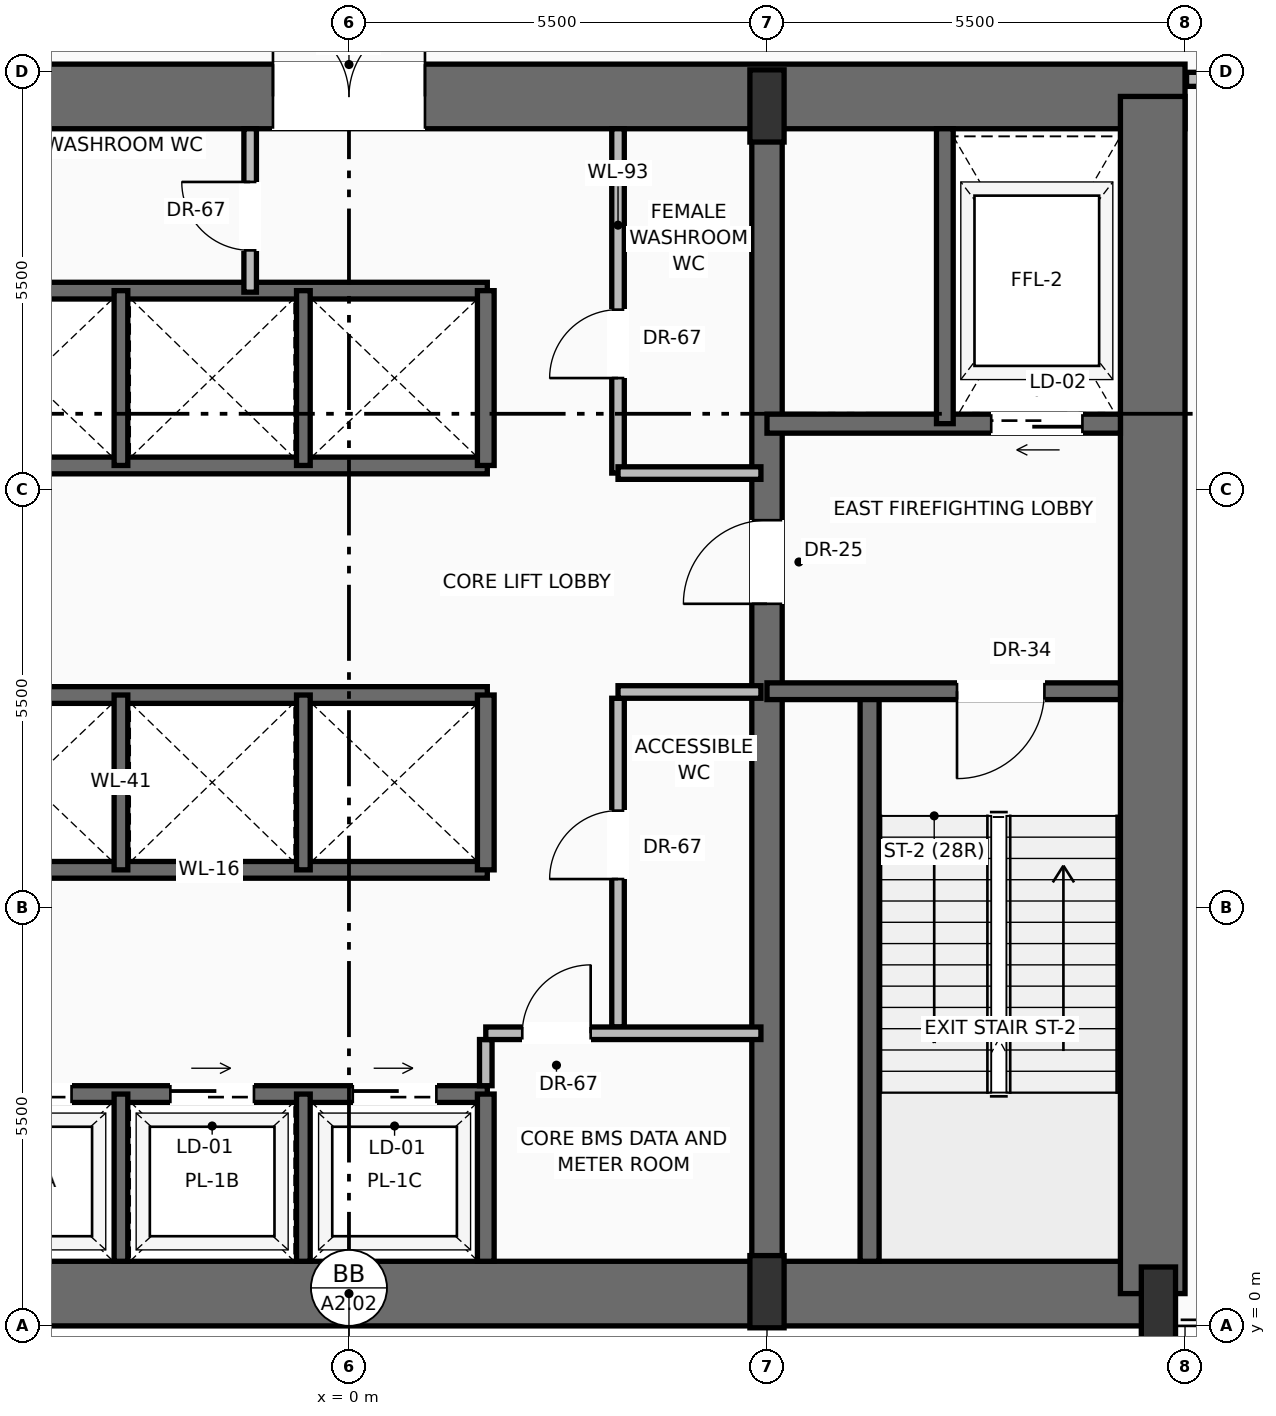
"""IFC4 building model, lengths in metres.
Left out: names, types, materials, properties, quantities, classifications, styles, units other than length and angle.
Written with IfcOpenShell. Run it as: python <this file> out.ifc"""

import sys

from ifc_helpers import new_model, si_unit, direction, frame, frame_2d, origin, origin_2d, place, context, subcontext, project, spatial, rectangle, extrude, source, transform, mapped, element, fill, save


model = new_model("IFC4")
c1 = context("Model", 3, precision=1e-05, world=origin(), true_north=direction((0.0, 1.0)))
c2 = subcontext(c1, "Body", "Model", "MODEL_VIEW")
j1 = project(units=[si_unit("LENGTHUNIT", "METRE"), si_unit("PLANEANGLEUNIT", "RADIAN")], contexts=[c1])
p1 = place(None, origin())
s1 = spatial("IfcSite", under=j1, at=p1, CompositionType="ELEMENT")
p2 = place(p1, origin())
s2 = spatial("IfcBuilding", under=s1, at=p2, CompositionType="ELEMENT")
p3 = place(p2, frame((0.0, 0.0, 71.9)))
s3 = spatial("IfcBuildingStorey", under=s2, at=p3, CompositionType="ELEMENT", Elevation=71.9)
p4 = place(p3, frame((-10.65, 0.425, 0.0), z_axis=(0.0, 0.0, 1.0), x_axis=(1.0, 0.0, 0.0)))
e1 = element("IfcWall", 1, at=p4, inside=s3, PredefinedType="SHEAR", context=c2, shape_type="SweptSolid", body=[
    extrude(rectangle(XDim=21.3, YDim=0.85, at=frame_2d((10.65, 0.0))), origin(), (0.0, 0.0, 1.0), 4.45),
])
p5 = place(p3, frame((-11.0, 16.175, 0.0), z_axis=(0.0, 0.0, 1.0), x_axis=(1.0, 0.0, 0.0)))
e2 = element("IfcWall", 2, at=p5, inside=s3, PredefinedType="SHEAR", context=c2, shape_type="SweptSolid", body=[
    extrude(rectangle(XDim=22.0, YDim=0.85, at=frame_2d((11.0, 0.0))), origin(), (0.0, 0.0, 1.0), 4.45),
])
p6 = place(p5, frame((3.57, 0.0, 0.0)))
e3 = element("IfcOpeningElement", 3, at=p6, cuts=e2, PredefinedType="OPENING", context=c2, shape_type="SweptSolid", body=[
    extrude(rectangle(XDim=1.3, YDim=2.3, at=frame_2d((0.65, 1.15))), frame((0.0, 0.435, 0.0), z_axis=(0.0, -1.0, 0.0), x_axis=(1.0, 0.0, 0.0)), (0.0, 0.0, 1.0), 0.87),
])
p7 = place(p5, frame((10.0, 0.0, 0.0)))
e4 = element("IfcOpeningElement", 4, at=p7, cuts=e2, PredefinedType="OPENING", context=c2, shape_type="SweptSolid", body=[
    extrude(rectangle(XDim=2.0, YDim=2.4, at=frame_2d((1.0, 1.2))), frame((0.0, 0.435, 0.0), z_axis=(0.0, -1.0, 0.0), x_axis=(1.0, 0.0, 0.0)), (0.0, 0.0, 1.0), 0.87),
])
p8 = place(p3, frame((10.575, 0.425, 0.0), z_axis=(0.0, 0.0, 1.0), x_axis=(0.0, 1.0, 0.0)))
e5 = element("IfcWall", 5, at=p8, inside=s3, PredefinedType="SHEAR", context=c2, shape_type="SweptSolid", body=[
    extrude(rectangle(XDim=15.75, YDim=0.85, at=frame_2d((7.875, 0.0))), origin(), (0.0, 0.0, 1.0), 4.45),
])
p9 = place(p3, frame((5.5, 0.425, 0.0), z_axis=(0.0, 0.0, 1.0), x_axis=(0.0, 1.0, 0.0)))
e6 = element("IfcWall", 6, at=p9, inside=s3, PredefinedType="SHEAR", context=c2, shape_type="SweptSolid", body=[
    extrude(rectangle(XDim=15.75, YDim=0.4, at=frame_2d((7.875, 0.0))), origin(), (0.0, 0.0, 1.0), 4.45),
])
p10 = place(p9, frame((9.075, 0.0, 0.0)))
e7 = element("IfcOpeningElement", 7, at=p10, cuts=e6, PredefinedType="OPENING", context=c2, shape_type="SweptSolid", body=[
    extrude(rectangle(XDim=1.1, YDim=2.2, at=frame_2d((0.55, 1.1))), frame((0.0, 0.21, 0.0), z_axis=(0.0, -1.0, 0.0), x_axis=(1.0, 0.0, 0.0)), (0.0, 0.0, 1.0), 0.42),
])
m1 = source(origin(), c2, "Body", "SweptSolid", [
    extrude(rectangle(XDim=0.45, YDim=0.95, at=origin_2d()), origin(), (0.0, 0.0, 1.0), 4.7),
])
for number, where, z_axis, x_axis in (
    (8, (5.5, 0.45, 0.0), (0.0, 0.0, 1.0), (1.0, 0.0, 0.0)),
    (9, (10.65, 0.3, 0.0), (0.0, 0.0, 1.0), (1.0, 0.0, 0.0)),
    (10, (5.5, 16.05, 0.0), (0.0, 0.0, 1.0), (1.0, 0.0, 0.0)),
):
    element("IfcColumn", number, at=place(p3, frame(where, z_axis=z_axis, x_axis=x_axis)), inside=s3, PredefinedType="PILASTER", context=c2, shape_type="MappedRepresentation", body=[
        mapped(m1, transform((0.0, 0.0, 0.0), scale=1.0)),
    ])
p11 = place(p3, frame((6.85, 0.85, 0.0), z_axis=(0.0, 0.0, 1.0), x_axis=(0.0, 1.0, 0.0)))
e11 = element("IfcWall", 11, at=p11, inside=s3, PredefinedType="SOLIDWALL", context=c2, shape_type="SweptSolid", body=[
    extrude(rectangle(XDim=7.5, YDim=0.25, at=frame_2d((3.75, 0.0))), origin(), (0.0, 0.0, 1.0), 4.45),
])
p12 = place(p3, frame((10.15, 8.35, 0.0), z_axis=(0.0, 0.0, 1.0), x_axis=(-1.0, 0.0, 0.0)))
e12 = element("IfcWall", 12, at=p12, inside=s3, PredefinedType="SOLIDWALL", context=c2, shape_type="SweptSolid", body=[
    extrude(rectangle(XDim=4.65, YDim=0.22, at=frame_2d((2.325, 0.0))), origin(), (0.0, 0.0, 1.0), 4.45),
])
p13 = place(p12, frame((1.0, 0.0, 0.0)))
e13 = element("IfcOpeningElement", 13, at=p13, cuts=e12, PredefinedType="OPENING", context=c2, shape_type="SweptSolid", body=[
    extrude(rectangle(XDim=1.15, YDim=2.2, at=frame_2d((0.575, 1.1))), frame((0.0, 0.12, 0.0), z_axis=(0.0, -1.0, 0.0), x_axis=(1.0, 0.0, 0.0)), (0.0, 0.0, 1.0), 0.24),
])
p14 = place(p3, frame((10.15, 11.87, 0.0), z_axis=(0.0, 0.0, 1.0), x_axis=(-1.0, 0.0, 0.0)))
e14 = element("IfcWall", 14, at=p14, inside=s3, PredefinedType="SOLIDWALL", context=c2, shape_type="SweptSolid", body=[
    extrude(rectangle(XDim=4.65, YDim=0.25, at=frame_2d((2.325, 0.0))), origin(), (0.0, 0.0, 1.0), 4.45),
])
p15 = place(p14, frame((0.5, 0.0, 0.0)))
e15 = element("IfcOpeningElement", 15, at=p15, cuts=e14, PredefinedType="OPENING", context=c2, shape_type="SweptSolid", body=[
    extrude(rectangle(XDim=1.2, YDim=2.25, at=frame_2d((0.6, 1.125))), frame((0.0, 0.135, 0.0), z_axis=(0.0, -1.0, 0.0), x_axis=(1.0, 0.0, 0.0)), (0.0, 0.0, 1.0), 0.27),
])
p16 = place(p3, frame((7.84, 11.87, 0.0), z_axis=(0.0, 0.0, 1.0), x_axis=(0.0, 1.0, 0.0)))
e16 = element("IfcWall", 16, at=p16, inside=s3, PredefinedType="SOLIDWALL", context=c2, shape_type="SweptSolid", body=[
    extrude(rectangle(XDim=3.88, YDim=0.22, at=frame_2d((1.94, 0.0))), origin(), (0.0, 0.0, 1.0), 4.45),
])
p17 = place(p3, frame((-5.5, 3.05, 0.0), z_axis=(0.0, 0.0, 1.0), x_axis=(1.0, 0.0, 0.0)))
e17 = element("IfcWall", 17, at=p17, inside=s3, PredefinedType="SOLIDWALL", context=c2, shape_type="SweptSolid", body=[
    extrude(rectangle(XDim=7.32, YDim=0.22, at=frame_2d((3.66, 0.0))), origin(), (0.0, 0.0, 1.0), 4.45),
])
p18 = place(p17, frame((0.75, 0.0, 0.0)))
e18 = element("IfcOpeningElement", 18, at=p18, cuts=e17, PredefinedType="OPENING", context=c2, shape_type="SweptSolid", body=[
    extrude(rectangle(XDim=1.1, YDim=2.2, at=frame_2d((0.55, 1.1))), frame((0.0, 0.12, 0.0), z_axis=(0.0, -1.0, 0.0), x_axis=(1.0, 0.0, 0.0)), (0.0, 0.0, 1.0), 0.24),
])
p19 = place(p17, frame((3.15, 0.0, 0.0)))
e19 = element("IfcOpeningElement", 19, at=p19, cuts=e17, PredefinedType="OPENING", context=c2, shape_type="SweptSolid", body=[
    extrude(rectangle(XDim=1.1, YDim=2.2, at=frame_2d((0.55, 1.1))), frame((0.0, 0.12, 0.0), z_axis=(0.0, -1.0, 0.0), x_axis=(1.0, 0.0, 0.0)), (0.0, 0.0, 1.0), 0.24),
])
p20 = place(p17, frame((5.55, 0.0, 0.0)))
e20 = element("IfcOpeningElement", 20, at=p20, cuts=e17, PredefinedType="OPENING", context=c2, shape_type="SweptSolid", body=[
    extrude(rectangle(XDim=1.1, YDim=2.2, at=frame_2d((0.55, 1.1))), frame((0.0, 0.12, 0.0), z_axis=(0.0, -1.0, 0.0), x_axis=(1.0, 0.0, 0.0)), (0.0, 0.0, 1.0), 0.24),
])
p21 = place(p3, frame((1.8, 0.85, 0.0), z_axis=(0.0, 0.0, 1.0), x_axis=(0.0, 1.0, 0.0)))
e21 = element("IfcWall", 21, at=p21, inside=s3, PredefinedType="SOLIDWALL", context=c2, shape_type="SweptSolid", body=[
    extrude(rectangle(XDim=2.2, YDim=0.22, at=frame_2d((1.1, 0.0))), origin(), (0.0, 0.0, 1.0), 4.45),
])
for number, where, z_axis, x_axis in (
    (22, (-3.0, 0.85, 0.0), (0.0, 0.0, 1.0), (0.0, 1.0, 0.0)),
    (23, (-0.6, 0.85, 0.0), (0.0, 0.0, 1.0), (0.0, 1.0, 0.0)),
):
    element("IfcWall", number, at=place(p3, frame(where, z_axis=z_axis, x_axis=x_axis)), inside=s3, PredefinedType="SOLIDWALL", context=c2, shape_type="SweptSolid", body=[
        extrude(rectangle(XDim=2.2, YDim=0.18, at=frame_2d((1.1, 0.0))), origin(), (0.0, 0.0, 1.0), 4.45),
    ])
p22 = place(p3, frame((1.8, 3.16, 0.0), z_axis=(0.0, 0.0, 1.0), x_axis=(0.0, 1.0, 0.0)))
e24 = element("IfcWall", 24, at=p22, inside=s3, PredefinedType="PARTITIONING", context=c2, shape_type="SweptSolid", body=[
    extrude(rectangle(XDim=0.608, YDim=0.165, at=frame_2d((0.304, 0.0))), origin(), (0.0, 0.0, 1.0), 4.442),
])
p23 = place(p3, frame((3.54, 3.933, 0.0), z_axis=(0.0, 0.0, 1.0), x_axis=(0.0, 1.0, 0.0)))
e25 = element("IfcWall", 25, at=p23, inside=s3, PredefinedType="PARTITIONING", context=c2, shape_type="SweptSolid", body=[
    extrude(rectangle(XDim=4.325, YDim=0.165, at=frame_2d((2.163, 0.0))), origin(), (0.0, 0.0, 1.0), 4.442),
])
p24 = place(p23, frame((1.946, 0.0, 0.0)))
e26 = element("IfcOpeningElement", 26, at=p24, cuts=e25, PredefinedType="OPENING", context=c2, shape_type="SweptSolid", body=[
    extrude(rectangle(XDim=0.9, YDim=2.1, at=frame_2d((0.45, 1.05))), frame((0.0, 0.093, 0.0), z_axis=(0.0, -1.0, 0.0), x_axis=(1.0, 0.0, 0.0)), (0.0, 0.0, 1.0), 0.185),
])
p25 = place(p3, frame((3.54, 8.34, 0.0), z_axis=(0.0, 0.0, 1.0), x_axis=(1.0, 0.0, 0.0)))
e27 = element("IfcWall", 27, at=p25, inside=s3, PredefinedType="PARTITIONING", context=c2, shape_type="SweptSolid", body=[
    extrude(rectangle(XDim=1.88, YDim=0.165, at=frame_2d((0.94, 0.0))), origin(), (0.0, 0.0, 1.0), 4.442),
])
p26 = place(p3, frame((1.8, 3.85, 0.0), z_axis=(0.0, 0.0, 1.0), x_axis=(1.0, 0.0, 0.0)))
e28 = element("IfcWall", 28, at=p26, inside=s3, PredefinedType="PARTITIONING", context=c2, shape_type="SweptSolid", body=[
    extrude(rectangle(XDim=3.62, YDim=0.165, at=frame_2d((1.81, 0.0))), origin(), (0.0, 0.0, 1.0), 4.442),
])
p27 = place(p26, frame((0.48, 0.0, 0.0)))
e29 = element("IfcOpeningElement", 29, at=p27, cuts=e28, PredefinedType="OPENING", context=c2, shape_type="SweptSolid", body=[
    extrude(rectangle(XDim=0.9, YDim=2.1, at=frame_2d((0.45, 1.05))), frame((0.0, 0.093, 0.0), z_axis=(0.0, -1.0, 0.0), x_axis=(1.0, 0.0, 0.0)), (0.0, 0.0, 1.0), 0.185),
])
for number, where, z_axis, x_axis in (
    (30, (-5.5, 6.0, 0.0), (0.0, 0.0, 1.0), (1.0, 0.0, 0.0)),
    (31, (-5.5, 8.3, 0.0), (0.0, 0.0, 1.0), (1.0, 0.0, 0.0)),
):
    element("IfcWall", number, at=place(p3, frame(where, z_axis=z_axis, x_axis=x_axis)), inside=s3, PredefinedType="SOLIDWALL", context=c2, shape_type="SweptSolid", body=[
        extrude(rectangle(XDim=7.32, YDim=0.22, at=frame_2d((3.66, 0.0))), origin(), (0.0, 0.0, 1.0), 4.45),
    ])
p28 = place(p3, frame((1.8, 6.0, 0.0), z_axis=(0.0, 0.0, 1.0), x_axis=(0.0, 1.0, 0.0)))
e32 = element("IfcWall", 32, at=p28, inside=s3, PredefinedType="SOLIDWALL", context=c2, shape_type="SweptSolid", body=[
    extrude(rectangle(XDim=2.3, YDim=0.22, at=frame_2d((1.15, 0.0))), origin(), (0.0, 0.0, 1.0), 4.45),
])
for number, where, z_axis, x_axis in (
    (33, (-3.0, 6.0, 0.0), (0.0, 0.0, 1.0), (0.0, 1.0, 0.0)),
    (34, (-0.6, 6.0, 0.0), (0.0, 0.0, 1.0), (0.0, 1.0, 0.0)),
):
    element("IfcWall", number, at=place(p3, frame(where, z_axis=z_axis, x_axis=x_axis)), inside=s3, PredefinedType="SOLIDWALL", context=c2, shape_type="SweptSolid", body=[
        extrude(rectangle(XDim=2.3, YDim=0.18, at=frame_2d((1.15, 0.0))), origin(), (0.0, 0.0, 1.0), 4.45),
    ])
for number, where, z_axis, x_axis in (
    (35, (-5.5, 11.32, 0.0), (0.0, 0.0, 1.0), (1.0, 0.0, 0.0)),
    (36, (-5.5, 13.62, 0.0), (0.0, 0.0, 1.0), (1.0, 0.0, 0.0)),
):
    element("IfcWall", number, at=place(p3, frame(where, z_axis=z_axis, x_axis=x_axis)), inside=s3, PredefinedType="SOLIDWALL", context=c2, shape_type="SweptSolid", body=[
        extrude(rectangle(XDim=7.32, YDim=0.22, at=frame_2d((3.66, 0.0))), origin(), (0.0, 0.0, 1.0), 4.45),
    ])
p29 = place(p3, frame((1.8, 11.32, 0.0), z_axis=(0.0, 0.0, 1.0), x_axis=(0.0, 1.0, 0.0)))
e37 = element("IfcWall", 37, at=p29, inside=s3, PredefinedType="SOLIDWALL", context=c2, shape_type="SweptSolid", body=[
    extrude(rectangle(XDim=2.3, YDim=0.22, at=frame_2d((1.15, 0.0))), origin(), (0.0, 0.0, 1.0), 4.45),
])
for number, where, z_axis, x_axis in (
    (38, (-3.0, 11.32, 0.0), (0.0, 0.0, 1.0), (0.0, 1.0, 0.0)),
    (39, (-0.6, 11.32, 0.0), (0.0, 0.0, 1.0), (0.0, 1.0, 0.0)),
):
    element("IfcWall", number, at=place(p3, frame(where, z_axis=z_axis, x_axis=x_axis)), inside=s3, PredefinedType="SOLIDWALL", context=c2, shape_type="SweptSolid", body=[
        extrude(rectangle(XDim=2.3, YDim=0.18, at=frame_2d((1.15, 0.0))), origin(), (0.0, 0.0, 1.0), 4.45),
    ])
p30 = place(p3, frame((-1.3, 13.6, 0.0), z_axis=(0.0, 0.0, 1.0), x_axis=(0.0, 1.0, 0.0)))
e40 = element("IfcWall", 40, at=p30, inside=s3, PredefinedType="PARTITIONING", context=c2, shape_type="SweptSolid", body=[
    extrude(rectangle(XDim=2.15, YDim=0.165, at=frame_2d((1.075, 0.0))), origin(), (0.0, 0.0, 1.0), 4.442),
])
p31 = place(p30, frame((0.55, 0.0, 0.0)))
e41 = element("IfcOpeningElement", 41, at=p31, cuts=e40, PredefinedType="OPENING", context=c2, shape_type="SweptSolid", body=[
    extrude(rectangle(XDim=0.9, YDim=2.1, at=frame_2d((0.45, 1.05))), frame((0.0, 0.093, 0.0), z_axis=(0.0, -1.0, 0.0), x_axis=(1.0, 0.0, 0.0)), (0.0, 0.0, 1.0), 0.185),
])
p32 = place(p3, frame((3.54, 11.22, 0.0), z_axis=(0.0, 0.0, 1.0), x_axis=(0.0, 1.0, 0.0)))
e42 = element("IfcWall", 42, at=p32, inside=s3, PredefinedType="PARTITIONING", context=c2, shape_type="SweptSolid", body=[
    extrude(rectangle(XDim=4.53, YDim=0.165, at=frame_2d((2.265, 0.0))), origin(), (0.0, 0.0, 1.0), 4.442),
])
p33 = place(p32, frame((1.25, 0.0, 0.0)))
e43 = element("IfcOpeningElement", 43, at=p33, cuts=e42, PredefinedType="OPENING", context=c2, shape_type="SweptSolid", body=[
    extrude(rectangle(XDim=0.9, YDim=2.1, at=frame_2d((0.45, 1.05))), frame((0.0, 0.093, 0.0), z_axis=(0.0, -1.0, 0.0), x_axis=(1.0, 0.0, 0.0)), (0.0, 0.0, 1.0), 0.185),
])
p34 = place(p3, frame((3.54, 11.22, 0.0), z_axis=(0.0, 0.0, 1.0), x_axis=(1.0, 0.0, 0.0)))
e44 = element("IfcWall", 44, at=p34, inside=s3, PredefinedType="PARTITIONING", context=c2, shape_type="SweptSolid", body=[
    extrude(rectangle(XDim=1.88, YDim=0.165, at=frame_2d((0.94, 0.0))), origin(), (0.0, 0.0, 1.0), 4.442),
])
p35 = place(p3, frame((11.02, 16.4, 0.0), z_axis=(0.0, 0.0, 1.0), x_axis=(1.0, 0.0, 0.0)))
e45 = element("IfcWall", 45, at=p35, inside=s3, PredefinedType="PARTITIONING", context=c2, shape_type="SweptSolid", body=[
    extrude(rectangle(XDim=13.049, YDim=0.185, at=frame_2d((6.524, 0.0))), origin(), (0.0, 0.0, 1.0), 4.442),
])
p36 = place(p35, frame((5.775, 0.0, 0.0)))
e46 = element("IfcOpeningElement", 46, at=p36, cuts=e45, PredefinedType="OPENING", context=c2, shape_type="SweptSolid", body=[
    extrude(rectangle(XDim=1.5, YDim=2.25, at=frame_2d((0.75, 1.125))), frame((0.0, 0.103, 0.0), z_axis=(0.0, -1.0, 0.0), x_axis=(1.0, 0.0, 0.0)), (0.0, 0.0, 1.0), 0.205),
])
m2 = source(origin(), c2, "Body", "SweptSolid", [
    extrude(rectangle(XDim=1.15, YDim=2.2, at=frame_2d((0.575, 1.1))), frame((0.0, 0.025, 0.0), z_axis=(0.0, -1.0, 0.0), x_axis=(1.0, 0.0, 0.0)), (0.0, 0.0, 1.0), 0.05),
])
p37 = place(p13, origin())
e47 = element("IfcDoor", 47, at=p37, inside=s3, OperationType="SINGLE_SWING_RIGHT", PredefinedType="DOOR", context=c2, shape_type="MappedRepresentation", body=[
    mapped(m2, transform((0.0, 0.0, 0.0), scale=1.0)),
])
fill(e13, e47)
m3 = source(origin(), c2, "Body", "SweptSolid", [
    extrude(rectangle(XDim=1.1, YDim=2.2, at=frame_2d((0.55, 1.1))), frame((0.0, 0.025, 0.0), z_axis=(0.0, -1.0, 0.0), x_axis=(1.0, 0.0, 0.0)), (0.0, 0.0, 1.0), 0.05),
])
p38 = place(p10, origin())
e48 = element("IfcDoor", 48, at=p38, inside=s3, OperationType="SINGLE_SWING_LEFT", PredefinedType="DOOR", context=c2, shape_type="MappedRepresentation", body=[
    mapped(m3, transform((0.0, 0.0, 0.0), scale=1.0)),
])
fill(e7, e48)
m4 = source(origin(), c2, "Body", "SweptSolid", [
    extrude(rectangle(XDim=1.2, YDim=2.25, at=frame_2d((0.6, 1.125))), frame((0.0, 0.025, 0.0), z_axis=(0.0, -1.0, 0.0), x_axis=(1.0, 0.0, 0.0)), (0.0, 0.0, 1.0), 0.05),
])
p39 = place(p15, origin())
e49 = element("IfcDoor", 49, at=p39, inside=s3, OperationType="SLIDING_TO_RIGHT", PredefinedType="DOOR", context=c2, shape_type="MappedRepresentation", body=[
    mapped(m4, transform((0.0, 0.0, 0.0), scale=1.0)),
])
fill(e15, e49)
m5 = source(origin(), c2, "Body", "SweptSolid", [
    extrude(rectangle(XDim=2.0, YDim=2.4, at=frame_2d((1.0, 1.2))), frame((0.0, 0.025, 0.0), z_axis=(0.0, -1.0, 0.0), x_axis=(1.0, 0.0, 0.0)), (0.0, 0.0, 1.0), 0.05),
])
p40 = place(p7, origin())
e50 = element("IfcDoor", 50, at=p40, inside=s3, OperationType="DOUBLE_DOOR_SINGLE_SWING", PredefinedType="DOOR", context=c2, shape_type="MappedRepresentation", body=[
    mapped(m5, transform((0.0, 0.0, 0.0), scale=1.0)),
])
fill(e4, e50)
m6 = source(origin(), c2, "Body", "SweptSolid", [
    extrude(rectangle(XDim=1.1, YDim=2.2, at=frame_2d((0.55, 1.1))), frame((0.0, 0.025, 0.0), z_axis=(0.0, -1.0, 0.0), x_axis=(1.0, 0.0, 0.0)), (0.0, 0.0, 1.0), 0.05),
])
p41 = place(p18, origin())
e51 = element("IfcDoor", 51, at=p41, inside=s3, OperationType="SLIDING_TO_RIGHT", PredefinedType="DOOR", context=c2, shape_type="MappedRepresentation", body=[
    mapped(m6, transform((0.0, 0.0, 0.0), scale=1.0)),
])
fill(e18, e51)
p42 = place(p19, origin())
e52 = element("IfcDoor", 52, at=p42, inside=s3, OperationType="SLIDING_TO_RIGHT", PredefinedType="DOOR", context=c2, shape_type="MappedRepresentation", body=[
    mapped(m6, transform((0.0, 0.0, 0.0), scale=1.0)),
])
fill(e19, e52)
p43 = place(p20, origin())
e53 = element("IfcDoor", 53, at=p43, inside=s3, OperationType="SLIDING_TO_RIGHT", PredefinedType="DOOR", context=c2, shape_type="MappedRepresentation", body=[
    mapped(m6, transform((0.0, 0.0, 0.0), scale=1.0)),
])
fill(e20, e53)
m7 = source(origin(), c2, "Body", "SweptSolid", [
    extrude(rectangle(XDim=0.9, YDim=2.1, at=frame_2d((0.45, 1.05))), frame((0.0, 0.025, 0.0), z_axis=(0.0, -1.0, 0.0), x_axis=(1.0, 0.0, 0.0)), (0.0, 0.0, 1.0), 0.05),
])
p44 = place(p27, origin())
e54 = element("IfcDoor", 54, at=p44, inside=s3, OperationType="SINGLE_SWING_RIGHT", PredefinedType="DOOR", context=c2, shape_type="MappedRepresentation", body=[
    mapped(m7, transform((0.0, 0.0, 0.0), scale=1.0)),
])
fill(e29, e54)
p45 = place(p24, origin())
e55 = element("IfcDoor", 55, at=p45, inside=s3, OperationType="SINGLE_SWING_LEFT", PredefinedType="DOOR", context=c2, shape_type="MappedRepresentation", body=[
    mapped(m7, transform((0.0, 0.0, 0.0), scale=1.0)),
])
fill(e26, e55)
p46 = place(p31, origin())
e56 = element("IfcDoor", 56, at=p46, inside=s3, OperationType="SINGLE_SWING_RIGHT", PredefinedType="DOOR", context=c2, shape_type="MappedRepresentation", body=[
    mapped(m7, transform((0.0, 0.0, 0.0), scale=1.0)),
])
fill(e41, e56)
p47 = place(p33, origin())
e57 = element("IfcDoor", 57, at=p47, inside=s3, OperationType="SINGLE_SWING_LEFT", PredefinedType="DOOR", context=c2, shape_type="MappedRepresentation", body=[
    mapped(m7, transform((0.0, 0.0, 0.0), scale=1.0)),
])
fill(e43, e57)
save(model, sys.argv[1])
